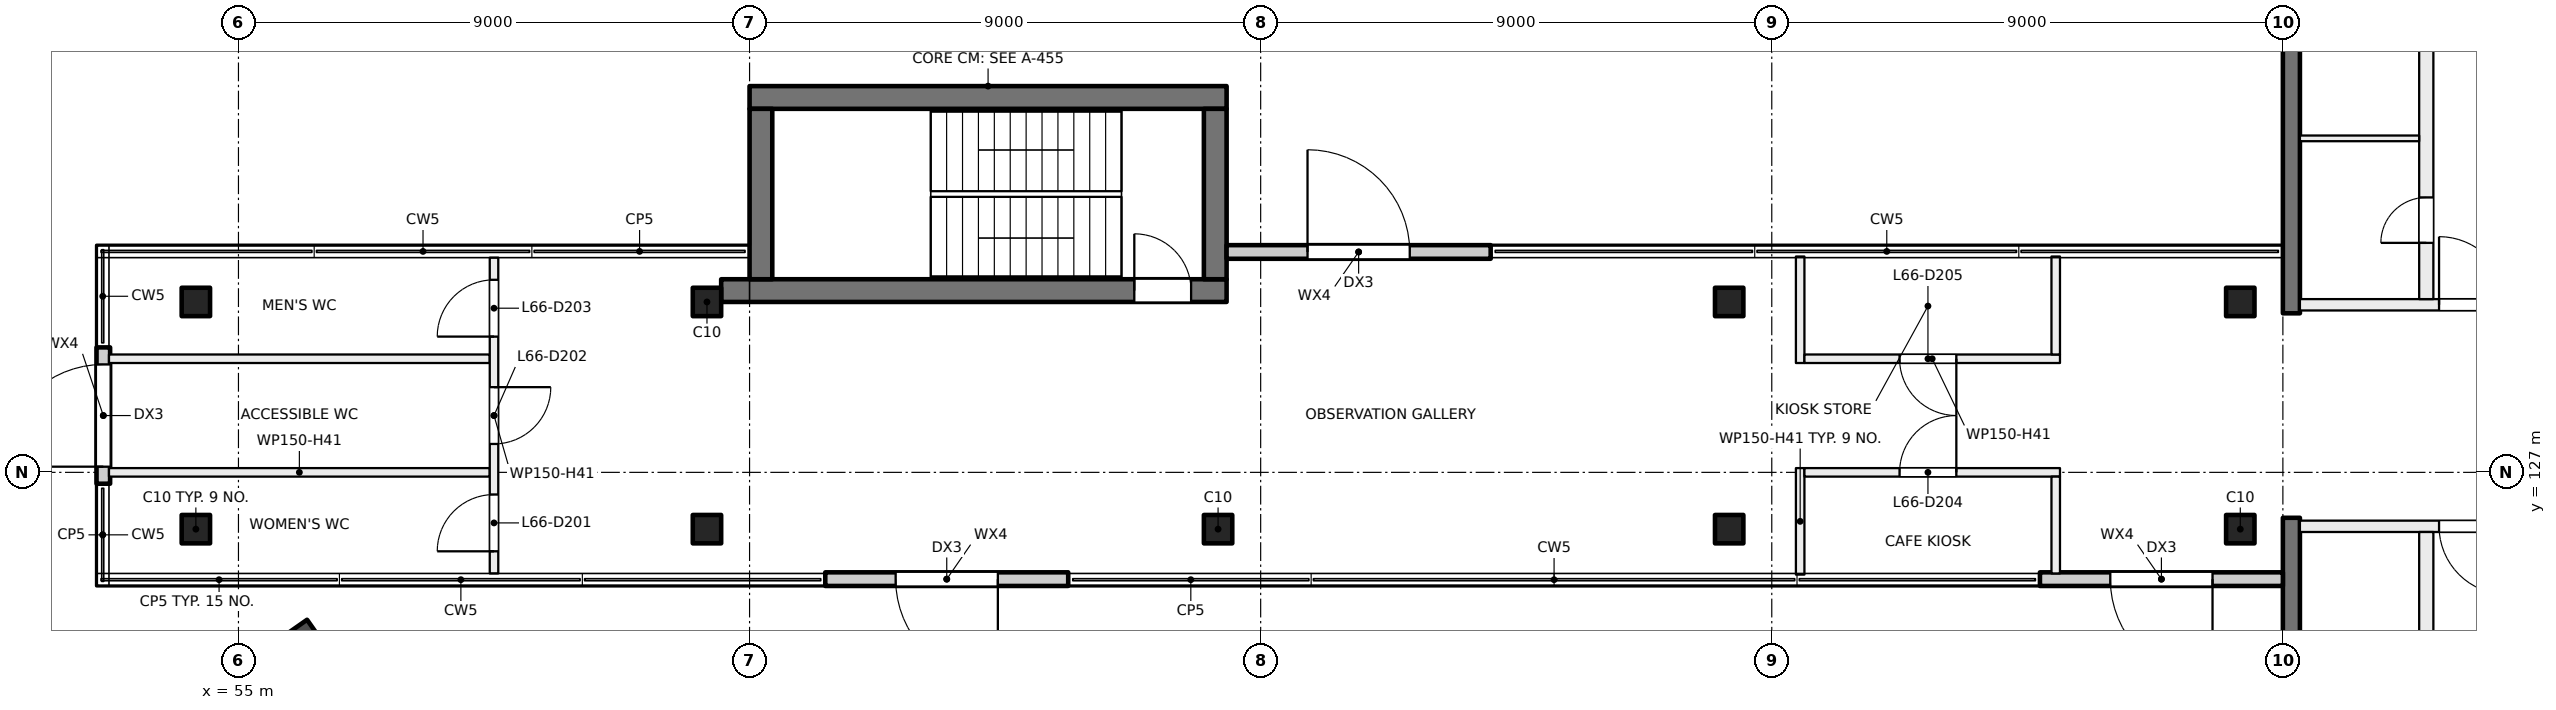
"""IFC4 building model, lengths in metres.
Left out: names, types, materials, properties, quantities, classifications, styles, units other than length and angle.
Written with IfcOpenShell. Run it as: python <this file> out.ifc"""

import sys

from ifc_helpers import new_model, si_unit, direction, frame, frame_2d, origin, origin_2d, place, context, subcontext, project, spatial, rectangle, hollow_rectangle, extrude, element, fill, save


model = new_model("IFC4")
c1 = context("Model", 3, precision=1e-05, world=origin(), true_north=direction((0.0, 1.0)))
c2 = subcontext(c1, "Body", "Model", "MODEL_VIEW")
j1 = project(units=[si_unit("LENGTHUNIT", "METRE"), si_unit("PLANEANGLEUNIT", "RADIAN")], contexts=[c1])
p1 = place(None, origin())
s1 = spatial("IfcSite", under=j1, at=p1, CompositionType="ELEMENT")
p2 = place(p1, origin())
s2 = spatial("IfcBuilding", under=s1, at=p2, CompositionType="ELEMENT")
p3 = place(p2, frame((0.0, 0.0, 277.5)))
s3 = spatial("IfcBuildingStorey", under=s2, at=p3, CompositionType="ELEMENT", Elevation=277.5)
p4 = place(p3, frame((56.036, 123.43, 0.0), z_axis=(0.0, 0.0, 1.0), x_axis=(0.573576436351, -0.819152044289, 0.0)))
e1 = element("IfcColumn", 1, at=p4, inside=s3, PredefinedType="COLUMN", context=c2, shape_type="SweptSolid", body=[
    extrude(hollow_rectangle(XDim=1.4, YDim=1.4, WallThickness=0.025, at=origin_2d()), origin(), (0.0, 0.0, 1.0), 4.5),
])
for number, where, z_axis, x_axis in (
    (2, (54.25, 130.0, 0.0), (0.0, 0.0, 1.0), (1.0, 0.0, 0.0)),
    (3, (63.25, 130.0, 0.0), (0.0, 0.0, 1.0), (1.0, 0.0, 0.0)),
    (4, (81.25, 130.0, 0.0), (0.0, 0.0, 1.0), (1.0, 0.0, 0.0)),
    (5, (90.25, 130.0, 0.0), (0.0, 0.0, 1.0), (1.0, 0.0, 0.0)),
    (6, (54.25, 126.0, 0.0), (0.0, 0.0, 1.0), (1.0, 0.0, 0.0)),
    (7, (63.25, 126.0, 0.0), (0.0, 0.0, 1.0), (1.0, 0.0, 0.0)),
    (8, (72.25, 126.0, 0.0), (0.0, 0.0, 1.0), (1.0, 0.0, 0.0)),
    (9, (81.25, 126.0, 0.0), (0.0, 0.0, 1.0), (1.0, 0.0, 0.0)),
    (10, (90.25, 126.0, 0.0), (0.0, 0.0, 1.0), (1.0, 0.0, 0.0)),
):
    element("IfcColumn", number, at=place(p3, frame(where, z_axis=z_axis, x_axis=x_axis)), inside=s3, PredefinedType="COLUMN", context=c2, shape_type="SweptSolid", body=[
        extrude(rectangle(XDim=0.5, YDim=0.5, at=origin_2d()), origin(), (0.0, 0.0, 1.0), 4.5),
    ])
for number, where, z_axis, x_axis in (
    (11, (91.15, 138.55, 0.0), (0.0, 0.0, 1.0), (0.0, -1.0, 0.0)),
    (12, (91.15, 126.2, 0.0), (0.0, 0.0, 1.0), (0.0, -1.0, 0.0)),
):
    element("IfcWall", number, at=place(p3, frame(where, z_axis=z_axis, x_axis=x_axis)), inside=s3, PredefinedType="SHEAR", context=c2, shape_type="SweptSolid", body=[
        extrude(rectangle(XDim=8.75, YDim=0.3, at=frame_2d((4.375, 0.0))), origin(), (0.0, 0.0, 1.0), 4.5),
    ])
p5 = place(p3, frame((63.5, 130.2, 0.0), z_axis=(0.0, 0.0, 1.0), x_axis=(1.0, 0.0, 0.0)))
e13 = element("IfcWall", 13, at=p5, inside=s3, PredefinedType="SHEAR", context=c2, shape_type="SweptSolid", body=[
    extrude(rectangle(XDim=8.9, YDim=0.4, at=frame_2d((4.45, 0.0))), origin(), (0.0, 0.0, 1.0), 4.5),
])
p6 = place(p5, frame((7.275, 0.0, 0.0)))
e14 = element("IfcOpeningElement", 14, at=p6, cuts=e13, PredefinedType="OPENING", context=c2, shape_type="SweptSolid", body=[
    extrude(rectangle(XDim=1.0, YDim=2.1, at=frame_2d((0.5, 1.05))), frame((0.0, 0.21, 0.0), z_axis=(0.0, -1.0, 0.0), x_axis=(1.0, 0.0, 0.0)), (0.0, 0.0, 1.0), 0.42),
])
p7 = place(p3, frame((64.0, 133.6, 0.0), z_axis=(0.0, 0.0, 1.0), x_axis=(1.0, 0.0, 0.0)))
e15 = element("IfcWall", 15, at=p7, inside=s3, PredefinedType="SHEAR", context=c2, shape_type="SweptSolid", body=[
    extrude(rectangle(XDim=8.4, YDim=0.4, at=frame_2d((4.2, 0.0))), origin(), (0.0, 0.0, 1.0), 4.5),
])
for number, where, z_axis, x_axis in (
    (16, (64.2, 130.4, 0.0), (0.0, 0.0, 1.0), (0.0, 1.0, 0.0)),
    (17, (72.2, 130.4, 0.0), (0.0, 0.0, 1.0), (0.0, 1.0, 0.0)),
):
    element("IfcWall", number, at=place(p3, frame(where, z_axis=z_axis, x_axis=x_axis)), inside=s3, PredefinedType="SHEAR", context=c2, shape_type="SweptSolid", body=[
        extrude(rectangle(XDim=3.0, YDim=0.4, at=frame_2d((1.5, 0.0))), origin(), (0.0, 0.0, 1.0), 4.5),
    ])
p8 = place(p3, frame((52.62, 126.8, 0.0), z_axis=(0.0, 0.0, 1.0), x_axis=(0.0, 1.0, 0.0)))
e18 = element("IfcWall", 18, at=p8, inside=s3, PredefinedType="SOLIDWALL", context=c2, shape_type="SweptSolid", body=[
    extrude(rectangle(XDim=2.4, YDim=0.24, at=frame_2d((1.2, 0.0))), origin(), (0.0, 0.0, 1.0), 4.125),
])
p9 = place(p8, frame((0.3, 0.0, 0.0)))
e19 = element("IfcOpeningElement", 19, at=p9, cuts=e18, PredefinedType="OPENING", context=c2, shape_type="SweptSolid", body=[
    extrude(rectangle(XDim=1.8, YDim=2.4, at=frame_2d((0.9, 1.2))), frame((0.0, 0.13, 0.0), z_axis=(0.0, -1.0, 0.0), x_axis=(1.0, 0.0, 0.0)), (0.0, 0.0, 1.0), 0.26),
])
p10 = place(p3, frame((91.0, 125.12, 0.0), z_axis=(0.0, 0.0, 1.0), x_axis=(-1.0, 0.0, 0.0)))
e20 = element("IfcWall", 20, at=p10, inside=s3, PredefinedType="SOLIDWALL", context=c2, shape_type="SweptSolid", body=[
    extrude(rectangle(XDim=4.278, YDim=0.24, at=frame_2d((2.139, 0.0))), origin(), (0.0, 0.0, 1.0), 4.125),
])
p11 = place(p10, frame((1.239, 0.0, 0.0)))
e21 = element("IfcOpeningElement", 21, at=p11, cuts=e20, PredefinedType="OPENING", context=c2, shape_type="SweptSolid", body=[
    extrude(rectangle(XDim=1.8, YDim=2.4, at=frame_2d((0.9, 1.2))), frame((0.0, 0.13, 0.0), z_axis=(0.0, -1.0, 0.0), x_axis=(1.0, 0.0, 0.0)), (0.0, 0.0, 1.0), 0.26),
])
p12 = place(p3, frame((69.611, 125.12, 0.0), z_axis=(0.0, 0.0, 1.0), x_axis=(-1.0, 0.0, 0.0)))
e22 = element("IfcWall", 22, at=p12, inside=s3, PredefinedType="SOLIDWALL", context=c2, shape_type="SweptSolid", body=[
    extrude(rectangle(XDim=4.278, YDim=0.24, at=frame_2d((2.139, 0.0))), origin(), (0.0, 0.0, 1.0), 4.125),
])
p13 = place(p12, frame((1.239, 0.0, 0.0)))
e23 = element("IfcOpeningElement", 23, at=p13, cuts=e22, PredefinedType="OPENING", context=c2, shape_type="SweptSolid", body=[
    extrude(rectangle(XDim=1.8, YDim=2.4, at=frame_2d((0.9, 1.2))), frame((0.0, 0.13, 0.0), z_axis=(0.0, -1.0, 0.0), x_axis=(1.0, 0.0, 0.0)), (0.0, 0.0, 1.0), 0.26),
])
p14 = place(p3, frame((72.4, 130.88, 0.0), z_axis=(0.0, 0.0, 1.0), x_axis=(1.0, 0.0, 0.0)))
e24 = element("IfcWall", 24, at=p14, inside=s3, PredefinedType="SOLIDWALL", context=c2, shape_type="SweptSolid", body=[
    extrude(rectangle(XDim=4.65, YDim=0.24, at=frame_2d((2.325, 0.0))), origin(), (0.0, 0.0, 1.0), 4.125),
])
p15 = place(p14, frame((1.425, 0.0, 0.0)))
e25 = element("IfcOpeningElement", 25, at=p15, cuts=e24, PredefinedType="OPENING", context=c2, shape_type="SweptSolid", body=[
    extrude(rectangle(XDim=1.8, YDim=2.4, at=frame_2d((0.9, 1.2))), frame((0.0, 0.13, 0.0), z_axis=(0.0, -1.0, 0.0), x_axis=(1.0, 0.0, 0.0)), (0.0, 0.0, 1.0), 0.26),
])
p16 = place(p3, frame((95.25, 126.05, 0.0), z_axis=(0.0, 0.0, 1.0), x_axis=(-1.0, 0.0, 0.0)))
e26 = element("IfcWall", 26, at=p16, inside=s3, PredefinedType="PARTITIONING", context=c2, shape_type="SweptSolid", body=[
    extrude(rectangle(XDim=3.95, YDim=0.2, at=frame_2d((1.975, 0.0))), origin(), (0.0, 0.0, 1.0), 4.125),
])
p17 = place(p16, frame((0.3, 0.0, 0.0)))
e27 = element("IfcOpeningElement", 27, at=p17, cuts=e26, PredefinedType="OPENING", context=c2, shape_type="SweptSolid", body=[
    extrude(rectangle(XDim=1.2, YDim=2.1, at=frame_2d((0.6, 1.05))), frame((0.0, 0.11, 0.0), z_axis=(0.0, -1.0, 0.0), x_axis=(1.0, 0.0, 0.0)), (0.0, 0.0, 1.0), 0.22),
])
p18 = place(p3, frame((93.525, 117.45, 0.0), z_axis=(0.0, 0.0, 1.0), x_axis=(0.0, 1.0, 0.0)))
e28 = element("IfcWall", 28, at=p18, inside=s3, PredefinedType="PARTITIONING", context=c2, shape_type="SweptSolid", body=[
    extrude(rectangle(XDim=8.5, YDim=0.25, at=frame_2d((4.25, 0.0))), origin(), (0.0, 0.0, 1.0), 4.125),
])
p19 = place(p18, frame((3.85, 0.0, 0.0)))
e29 = element("IfcOpeningElement", 29, at=p19, cuts=e28, PredefinedType="OPENING", context=c2, shape_type="SweptSolid", body=[
    extrude(rectangle(XDim=0.8, YDim=2.1, at=frame_2d((0.4, 1.05))), frame((0.0, 0.135, 0.0), z_axis=(0.0, -1.0, 0.0), x_axis=(1.0, 0.0, 0.0)), (0.0, 0.0, 1.0), 0.27),
])
p20 = place(p3, frame((91.3, 129.95, 0.0), z_axis=(0.0, 0.0, 1.0), x_axis=(1.0, 0.0, 0.0)))
e30 = element("IfcWall", 30, at=p20, inside=s3, PredefinedType="PARTITIONING", context=c2, shape_type="SweptSolid", body=[
    extrude(rectangle(XDim=3.95, YDim=0.2, at=frame_2d((1.975, 0.0))), origin(), (0.0, 0.0, 1.0), 4.125),
])
p21 = place(p20, frame((2.45, 0.0, 0.0)))
e31 = element("IfcOpeningElement", 31, at=p21, cuts=e30, PredefinedType="OPENING", context=c2, shape_type="SweptSolid", body=[
    extrude(rectangle(XDim=1.2, YDim=2.1, at=frame_2d((0.6, 1.05))), frame((0.0, 0.11, 0.0), z_axis=(0.0, -1.0, 0.0), x_axis=(1.0, 0.0, 0.0)), (0.0, 0.0, 1.0), 0.22),
])
p22 = place(p3, frame((93.525, 130.05, 0.0), z_axis=(0.0, 0.0, 1.0), x_axis=(0.0, 1.0, 0.0)))
e32 = element("IfcWall", 32, at=p22, inside=s3, PredefinedType="PARTITIONING", context=c2, shape_type="SweptSolid", body=[
    extrude(rectangle(XDim=8.5, YDim=0.25, at=frame_2d((4.25, 0.0))), origin(), (0.0, 0.0, 1.0), 4.125),
])
p23 = place(p22, frame((0.99, 0.0, 0.0)))
e33 = element("IfcOpeningElement", 33, at=p23, cuts=e32, PredefinedType="OPENING", context=c2, shape_type="SweptSolid", body=[
    extrude(rectangle(XDim=0.8, YDim=2.1, at=frame_2d((0.4, 1.05))), frame((0.0, 0.135, 0.0), z_axis=(0.0, -1.0, 0.0), x_axis=(1.0, 0.0, 0.0)), (0.0, 0.0, 1.0), 0.27),
])
p24 = place(p22, frame((5.29, 0.0, 0.0)))
e34 = element("IfcOpeningElement", 34, at=p24, cuts=e32, PredefinedType="OPENING", context=c2, shape_type="SweptSolid", body=[
    extrude(rectangle(XDim=0.8, YDim=2.1, at=frame_2d((0.4, 1.05))), frame((0.0, 0.135, 0.0), z_axis=(0.0, -1.0, 0.0), x_axis=(1.0, 0.0, 0.0)), (0.0, 0.0, 1.0), 0.27),
])
p25 = place(p3, frame((91.3, 132.88, 0.0), z_axis=(0.0, 0.0, 1.0), x_axis=(1.0, 0.0, 0.0)))
e35 = element("IfcWall", 35, at=p25, inside=s3, PredefinedType="PARTITIONING", context=c2, shape_type="SweptSolid", body=[
    extrude(rectangle(XDim=2.1, YDim=0.1, at=frame_2d((1.05, 0.0))), origin(), (0.0, 0.0, 1.0), 4.125),
])
for number, where, z_axis, x_axis in (
    (36, (52.72, 127.0, 0.0), (0.0, 0.0, 1.0), (1.0, 0.0, 0.0)),
    (37, (52.72, 129.0, 0.0), (0.0, 0.0, 1.0), (1.0, 0.0, 0.0)),
):
    element("IfcWall", number, at=place(p3, frame(where, z_axis=z_axis, x_axis=x_axis)), inside=s3, PredefinedType="PARTITIONING", context=c2, shape_type="SweptSolid", body=[
        extrude(rectangle(XDim=6.705, YDim=0.15, at=frame_2d((3.353, 0.0))), origin(), (0.0, 0.0, 1.0), 4.125),
    ])
p26 = place(p3, frame((59.5, 125.22, 0.0), z_axis=(0.0, 0.0, 1.0), x_axis=(0.0, 1.0, 0.0)))
e38 = element("IfcWall", 38, at=p26, inside=s3, PredefinedType="PARTITIONING", context=c2, shape_type="SweptSolid", body=[
    extrude(rectangle(XDim=5.56, YDim=0.15, at=frame_2d((2.78, 0.0))), origin(), (0.0, 0.0, 1.0), 4.125),
])
p27 = place(p26, frame((0.39, 0.0, 0.0)))
e39 = element("IfcOpeningElement", 39, at=p27, cuts=e38, PredefinedType="OPENING", context=c2, shape_type="SweptSolid", body=[
    extrude(rectangle(XDim=1.0, YDim=2.1, at=frame_2d((0.5, 1.05))), frame((0.0, 0.085, 0.0), z_axis=(0.0, -1.0, 0.0), x_axis=(1.0, 0.0, 0.0)), (0.0, 0.0, 1.0), 0.17),
])
p28 = place(p26, frame((2.28, 0.0, 0.0)))
e40 = element("IfcOpeningElement", 40, at=p28, cuts=e38, PredefinedType="OPENING", context=c2, shape_type="SweptSolid", body=[
    extrude(rectangle(XDim=1.0, YDim=2.1, at=frame_2d((0.5, 1.05))), frame((0.0, 0.085, 0.0), z_axis=(0.0, -1.0, 0.0), x_axis=(1.0, 0.0, 0.0)), (0.0, 0.0, 1.0), 0.17),
])
p29 = place(p26, frame((4.17, 0.0, 0.0)))
e41 = element("IfcOpeningElement", 41, at=p29, cuts=e38, PredefinedType="OPENING", context=c2, shape_type="SweptSolid", body=[
    extrude(rectangle(XDim=1.0, YDim=2.1, at=frame_2d((0.5, 1.05))), frame((0.0, 0.085, 0.0), z_axis=(0.0, -1.0, 0.0), x_axis=(1.0, 0.0, 0.0)), (0.0, 0.0, 1.0), 0.17),
])
p30 = place(p3, frame((82.5, 125.2, 0.0), z_axis=(0.0, 0.0, 1.0), x_axis=(0.0, 1.0, 0.0)))
e42 = element("IfcWall", 42, at=p30, inside=s3, PredefinedType="PARTITIONING", context=c2, shape_type="SweptSolid", body=[
    extrude(rectangle(XDim=1.875, YDim=0.15, at=frame_2d((0.938, 0.0))), origin(), (0.0, 0.0, 1.0), 4.125),
])
p31 = place(p3, frame((87.075, 127.0, 0.0), z_axis=(0.0, 0.0, 1.0), x_axis=(-1.0, 0.0, 0.0)))
e43 = element("IfcWall", 43, at=p31, inside=s3, PredefinedType="PARTITIONING", context=c2, shape_type="SweptSolid", body=[
    extrude(rectangle(XDim=4.5, YDim=0.15, at=frame_2d((2.25, 0.0))), origin(), (0.0, 0.0, 1.0), 4.125),
])
p32 = place(p31, frame((1.825, 0.0, 0.0)))
e44 = element("IfcOpeningElement", 44, at=p32, cuts=e43, PredefinedType="OPENING", context=c2, shape_type="SweptSolid", body=[
    extrude(rectangle(XDim=1.0, YDim=2.1, at=frame_2d((0.5, 1.05))), frame((0.0, 0.085, 0.0), z_axis=(0.0, -1.0, 0.0), x_axis=(1.0, 0.0, 0.0)), (0.0, 0.0, 1.0), 0.17),
])
p33 = place(p3, frame((82.5, 128.925, 0.0), z_axis=(0.0, 0.0, 1.0), x_axis=(0.0, 1.0, 0.0)))
e45 = element("IfcWall", 45, at=p33, inside=s3, PredefinedType="PARTITIONING", context=c2, shape_type="SweptSolid", body=[
    extrude(rectangle(XDim=1.875, YDim=0.15, at=frame_2d((0.938, 0.0))), origin(), (0.0, 0.0, 1.0), 4.125),
])
p34 = place(p3, frame((82.575, 129.0, 0.0), z_axis=(0.0, 0.0, 1.0), x_axis=(1.0, 0.0, 0.0)))
e46 = element("IfcWall", 46, at=p34, inside=s3, PredefinedType="PARTITIONING", context=c2, shape_type="SweptSolid", body=[
    extrude(rectangle(XDim=4.5, YDim=0.15, at=frame_2d((2.25, 0.0))), origin(), (0.0, 0.0, 1.0), 4.125),
])
p35 = place(p34, frame((1.675, 0.0, 0.0)))
e47 = element("IfcOpeningElement", 47, at=p35, cuts=e46, PredefinedType="OPENING", context=c2, shape_type="SweptSolid", body=[
    extrude(rectangle(XDim=1.0, YDim=2.1, at=frame_2d((0.5, 1.05))), frame((0.0, 0.085, 0.0), z_axis=(0.0, -1.0, 0.0), x_axis=(1.0, 0.0, 0.0)), (0.0, 0.0, 1.0), 0.17),
])
p36 = place(p3, frame((87.0, 125.22, 0.0), z_axis=(0.0, 0.0, 1.0), x_axis=(0.0, 1.0, 0.0)))
e48 = element("IfcWall", 48, at=p36, inside=s3, PredefinedType="PARTITIONING", context=c2, shape_type="SweptSolid", body=[
    extrude(rectangle(XDim=1.705, YDim=0.15, at=frame_2d((0.853, 0.0))), origin(), (0.0, 0.0, 1.0), 4.125),
])
p37 = place(p3, frame((87.0, 129.075, 0.0), z_axis=(0.0, 0.0, 1.0), x_axis=(0.0, 1.0, 0.0)))
e49 = element("IfcWall", 49, at=p37, inside=s3, PredefinedType="PARTITIONING", context=c2, shape_type="SweptSolid", body=[
    extrude(rectangle(XDim=1.725, YDim=0.15, at=frame_2d((0.863, 0.0))), origin(), (0.0, 0.0, 1.0), 4.125),
])
p38 = place(p9, origin())
e50 = element("IfcDoor", 50, at=p38, inside=s3, OperationType="DOUBLE_DOOR_SINGLE_SWING", PredefinedType="DOOR", context=c2, shape_type="SweptSolid", body=[
    extrude(rectangle(XDim=1.8, YDim=2.4, at=frame_2d((0.9, 1.2))), frame((0.0, 0.025, 0.0), z_axis=(0.0, -1.0, 0.0), x_axis=(1.0, 0.0, 0.0)), (0.0, 0.0, 1.0), 0.05),
])
fill(e19, e50)
p39 = place(p11, origin())
e51 = element("IfcDoor", 51, at=p39, inside=s3, OperationType="DOUBLE_DOOR_SINGLE_SWING", PredefinedType="DOOR", context=c2, shape_type="SweptSolid", body=[
    extrude(rectangle(XDim=1.8, YDim=2.4, at=frame_2d((0.9, 1.2))), frame((0.0, 0.025, 0.0), z_axis=(0.0, -1.0, 0.0), x_axis=(1.0, 0.0, 0.0)), (0.0, 0.0, 1.0), 0.05),
])
fill(e21, e51)
p40 = place(p13, origin())
e52 = element("IfcDoor", 52, at=p40, inside=s3, OperationType="DOUBLE_DOOR_SINGLE_SWING", PredefinedType="DOOR", context=c2, shape_type="SweptSolid", body=[
    extrude(rectangle(XDim=1.8, YDim=2.4, at=frame_2d((0.9, 1.2))), frame((0.0, 0.025, 0.0), z_axis=(0.0, -1.0, 0.0), x_axis=(1.0, 0.0, 0.0)), (0.0, 0.0, 1.0), 0.05),
])
fill(e23, e52)
p41 = place(p15, origin())
e53 = element("IfcDoor", 53, at=p41, inside=s3, OperationType="DOUBLE_DOOR_SINGLE_SWING", PredefinedType="DOOR", context=c2, shape_type="SweptSolid", body=[
    extrude(rectangle(XDim=1.8, YDim=2.4, at=frame_2d((0.9, 1.2))), frame((0.0, 0.025, 0.0), z_axis=(0.0, -1.0, 0.0), x_axis=(1.0, 0.0, 0.0)), (0.0, 0.0, 1.0), 0.05),
])
fill(e25, e53)
p42 = place(p17, origin())
e54 = element("IfcDoor", 54, at=p42, inside=s3, OperationType="DOUBLE_DOOR_SINGLE_SWING", PredefinedType="DOOR", context=c2, shape_type="SweptSolid", body=[
    extrude(rectangle(XDim=1.2, YDim=2.1, at=frame_2d((0.6, 1.05))), frame((0.0, 0.025, 0.0), z_axis=(0.0, -1.0, 0.0), x_axis=(1.0, 0.0, 0.0)), (0.0, 0.0, 1.0), 0.05),
])
fill(e27, e54)
p43 = place(p21, origin())
e55 = element("IfcDoor", 55, at=p43, inside=s3, OperationType="DOUBLE_DOOR_SINGLE_SWING", PredefinedType="DOOR", context=c2, shape_type="SweptSolid", body=[
    extrude(rectangle(XDim=1.2, YDim=2.1, at=frame_2d((0.6, 1.05))), frame((0.0, 0.025, 0.0), z_axis=(0.0, -1.0, 0.0), x_axis=(1.0, 0.0, 0.0)), (0.0, 0.0, 1.0), 0.05),
])
fill(e31, e55)
p44 = place(p23, origin())
e56 = element("IfcDoor", 56, at=p44, inside=s3, OperationType="SINGLE_SWING_RIGHT", PredefinedType="DOOR", context=c2, shape_type="SweptSolid", body=[
    extrude(rectangle(XDim=0.8, YDim=2.1, at=frame_2d((0.4, 1.05))), frame((0.0, 0.025, 0.0), z_axis=(0.0, -1.0, 0.0), x_axis=(1.0, 0.0, 0.0)), (0.0, 0.0, 1.0), 0.05),
])
fill(e33, e56)
p45 = place(p6, origin())
e57 = element("IfcDoor", 57, at=p45, inside=s3, OperationType="SINGLE_SWING_LEFT", PredefinedType="DOOR", context=c2, shape_type="SweptSolid", body=[
    extrude(rectangle(XDim=1.0, YDim=2.1, at=frame_2d((0.5, 1.05))), frame((0.0, 0.025, 0.0), z_axis=(0.0, -1.0, 0.0), x_axis=(1.0, 0.0, 0.0)), (0.0, 0.0, 1.0), 0.05),
])
fill(e14, e57)
p46 = place(p27, origin())
e58 = element("IfcDoor", 58, at=p46, inside=s3, OperationType="SINGLE_SWING_LEFT", PredefinedType="DOOR", context=c2, shape_type="SweptSolid", body=[
    extrude(rectangle(XDim=1.0, YDim=2.1, at=frame_2d((0.5, 1.05))), frame((0.0, 0.025, 0.0), z_axis=(0.0, -1.0, 0.0), x_axis=(1.0, 0.0, 0.0)), (0.0, 0.0, 1.0), 0.05),
])
fill(e39, e58)
p47 = place(p28, origin())
e59 = element("IfcDoor", 59, at=p47, inside=s3, OperationType="SINGLE_SWING_RIGHT", PredefinedType="DOOR", context=c2, shape_type="SweptSolid", body=[
    extrude(rectangle(XDim=1.0, YDim=2.1, at=frame_2d((0.5, 1.05))), frame((0.0, 0.025, 0.0), z_axis=(0.0, -1.0, 0.0), x_axis=(1.0, 0.0, 0.0)), (0.0, 0.0, 1.0), 0.05),
])
fill(e40, e59)
p48 = place(p29, origin())
e60 = element("IfcDoor", 60, at=p48, inside=s3, OperationType="SINGLE_SWING_LEFT", PredefinedType="DOOR", context=c2, shape_type="SweptSolid", body=[
    extrude(rectangle(XDim=1.0, YDim=2.1, at=frame_2d((0.5, 1.05))), frame((0.0, 0.025, 0.0), z_axis=(0.0, -1.0, 0.0), x_axis=(1.0, 0.0, 0.0)), (0.0, 0.0, 1.0), 0.05),
])
fill(e41, e60)
p49 = place(p32, origin())
e61 = element("IfcDoor", 61, at=p49, inside=s3, OperationType="SINGLE_SWING_LEFT", PredefinedType="DOOR", context=c2, shape_type="SweptSolid", body=[
    extrude(rectangle(XDim=1.0, YDim=2.1, at=frame_2d((0.5, 1.05))), frame((0.0, 0.025, 0.0), z_axis=(0.0, -1.0, 0.0), x_axis=(1.0, 0.0, 0.0)), (0.0, 0.0, 1.0), 0.05),
])
fill(e44, e61)
p50 = place(p35, origin())
e62 = element("IfcDoor", 62, at=p50, inside=s3, OperationType="SINGLE_SWING_RIGHT", PredefinedType="DOOR", context=c2, shape_type="SweptSolid", body=[
    extrude(rectangle(XDim=1.0, YDim=2.1, at=frame_2d((0.5, 1.05))), frame((0.0, 0.025, 0.0), z_axis=(0.0, -1.0, 0.0), x_axis=(1.0, 0.0, 0.0)), (0.0, 0.0, 1.0), 0.05),
])
fill(e47, e62)
save(model, sys.argv[1])
